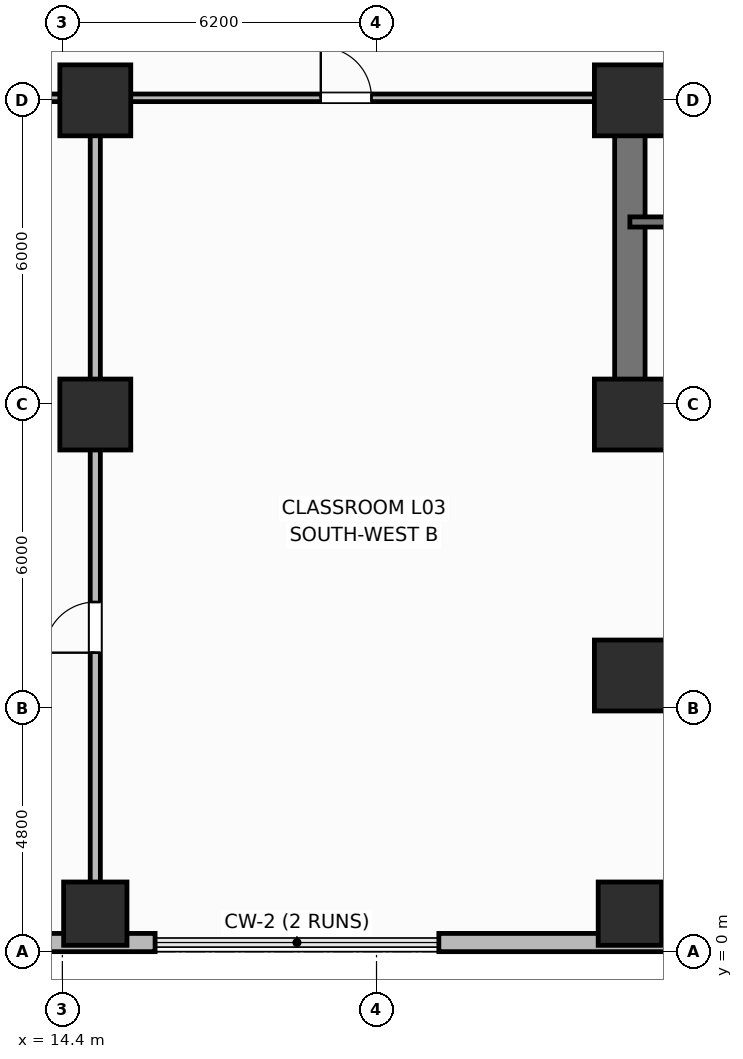
"""IFC4 building model, lengths in metres.
Left out: names, types, materials, properties, quantities, classifications, styles, units other than length and angle.
Written with IfcOpenShell. Run it as: python <this file> out.ifc"""

import sys

from ifc_helpers import new_model, si_unit, direction, frame, frame_2d, origin, origin_2d, place, context, subcontext, project, spatial, rectangle, extrude, element, fill, save


model = new_model("IFC4")
c1 = context("Model", 3, precision=1e-05, world=origin(), true_north=direction((0.0, 1.0)))
c2 = subcontext(c1, "Body", "Model", "MODEL_VIEW")
j1 = project(units=[si_unit("LENGTHUNIT", "METRE"), si_unit("PLANEANGLEUNIT", "RADIAN")], contexts=[c1])
p1 = place(None, origin())
s1 = spatial("IfcSite", under=j1, at=p1, CompositionType="ELEMENT")
p2 = place(p1, origin())
s2 = spatial("IfcBuilding", under=s1, at=p2, CompositionType="ELEMENT")
p3 = place(p2, frame((0.0, 0.0, 15.6)))
s3 = spatial("IfcBuildingStorey", under=s2, at=p3, CompositionType="ELEMENT", Elevation=15.6)
p4 = place(p3, frame((52.8, 10.6, 0.0), z_axis=(0.0, 0.0, 1.0), x_axis=(-1.0, 0.0, 0.0)))
e1 = element("IfcWall", 1, at=p4, inside=s3, PredefinedType="SHEAR", context=c2, shape_type="SweptSolid", body=[
    extrude(rectangle(XDim=27.2, YDim=0.6, at=frame_2d((13.6, 0.0))), origin(), (0.0, 0.0, 1.0), 4.5),
])
p5 = place(p3, frame((25.6, 10.9, 0.0), z_axis=(0.0, 0.0, 1.0), x_axis=(0.0, 1.0, 0.0)))
e2 = element("IfcWall", 2, at=p5, inside=s3, PredefinedType="SHEAR", context=c2, shape_type="SweptSolid", body=[
    extrude(rectangle(XDim=5.6, YDim=0.6, at=frame_2d((2.8, 0.0))), origin(), (0.0, 0.0, 1.0), 4.5),
])
p6 = place(p3, frame((25.6, 16.8, 0.0), z_axis=(0.0, 0.0, 1.0), x_axis=(1.0, 0.0, 0.0)))
e3 = element("IfcWall", 3, at=p6, inside=s3, PredefinedType="SHEAR", context=c2, shape_type="SweptSolid", body=[
    extrude(rectangle(XDim=27.2, YDim=0.6, at=frame_2d((13.6, 0.0))), origin(), (0.0, 0.0, 1.0), 4.5),
])
p7 = place(p6, frame((1.7, 0.0, 0.0)))
e4 = element("IfcOpeningElement", 4, at=p7, cuts=e3, PredefinedType="OPENING", context=c2, shape_type="SweptSolid", body=[
    extrude(rectangle(XDim=1.1, YDim=2.15, at=frame_2d((0.55, 1.075))), frame((0.0, 0.31, 0.0), z_axis=(0.0, -1.0, 0.0), x_axis=(1.0, 0.0, 0.0)), (0.0, 0.0, 1.0), 0.62),
])
p8 = place(p6, frame((4.45, 0.0, 0.0)))
e5 = element("IfcOpeningElement", 5, at=p8, cuts=e3, PredefinedType="OPENING", context=c2, shape_type="SweptSolid", body=[
    extrude(rectangle(XDim=0.85, YDim=2.1, at=frame_2d((0.425, 1.05))), frame((0.0, 0.31, 0.0), z_axis=(0.0, -1.0, 0.0), x_axis=(1.0, 0.0, 0.0)), (0.0, 0.0, 1.0), 0.62),
])
p9 = place(p6, frame((6.5, 0.0, 0.0)))
e6 = element("IfcOpeningElement", 6, at=p9, cuts=e3, PredefinedType="OPENING", context=c2, shape_type="SweptSolid", body=[
    extrude(rectangle(XDim=0.85, YDim=2.1, at=frame_2d((0.425, 1.05))), frame((0.0, 0.31, 0.0), z_axis=(0.0, -1.0, 0.0), x_axis=(1.0, 0.0, 0.0)), (0.0, 0.0, 1.0), 0.62),
])
p10 = place(p6, frame((13.0, 0.0, 0.0)))
e7 = element("IfcOpeningElement", 7, at=p10, cuts=e3, PredefinedType="OPENING", context=c2, shape_type="SweptSolid", body=[
    extrude(rectangle(XDim=1.2, YDim=2.15, at=frame_2d((0.6, 1.075))), frame((0.0, 0.31, 0.0), z_axis=(0.0, -1.0, 0.0), x_axis=(1.0, 0.0, 0.0)), (0.0, 0.0, 1.0), 0.62),
])
p11 = place(p6, frame((20.4, 0.0, 0.0)))
e8 = element("IfcOpeningElement", 8, at=p11, cuts=e3, PredefinedType="OPENING", context=c2, shape_type="SweptSolid", body=[
    extrude(rectangle(XDim=1.3, YDim=2.2, at=frame_2d((0.65, 1.1))), frame((0.0, 0.31, 0.0), z_axis=(0.0, -1.0, 0.0), x_axis=(1.0, 0.0, 0.0)), (0.0, 0.0, 1.0), 0.62),
])
p12 = place(p6, frame((24.65, 0.0, 0.0)))
e9 = element("IfcOpeningElement", 9, at=p12, cuts=e3, PredefinedType="OPENING", context=c2, shape_type="SweptSolid", body=[
    extrude(rectangle(XDim=0.85, YDim=2.1, at=frame_2d((0.425, 1.05))), frame((0.0, 0.31, 0.0), z_axis=(0.0, -1.0, 0.0), x_axis=(1.0, 0.0, 0.0)), (0.0, 0.0, 1.0), 0.62),
])
for number, where, z_axis, x_axis in (
    (10, (25.6, 10.6, 0.0), (0.0, 0.0, 1.0), (1.0, 0.0, 0.0)),
    (11, (25.6, 16.8, 0.0), (0.0, 0.0, 1.0), (1.0, 0.0, 0.0)),
):
    element("IfcColumn", number, at=place(p3, frame(where, z_axis=z_axis, x_axis=x_axis)), inside=s3, PredefinedType="COLUMN", context=c2, shape_type="SweptSolid", body=[
        extrude(rectangle(XDim=1.4, YDim=1.4, at=origin_2d()), origin(), (0.0, 0.0, 1.0), 4.5),
    ])
for number, where, z_axis, x_axis in (
    (12, (15.05, 0.75, 0.0), (0.0, 0.0, 1.0), (1.0, 0.0, 0.0)),
    (13, (25.6, 0.75, 0.0), (0.0, 0.0, 1.0), (1.0, 0.0, 0.0)),
):
    element("IfcColumn", number, at=place(p3, frame(where, z_axis=z_axis, x_axis=x_axis)), inside=s3, PredefinedType="COLUMN", context=c2, shape_type="SweptSolid", body=[
        extrude(rectangle(XDim=1.25, YDim=1.25, at=origin_2d()), origin(), (0.0, 0.0, 1.0), 4.5),
    ])
for number, where, z_axis, x_axis in (
    (14, (25.6, 5.45, 0.0), (0.0, 0.0, 1.0), (1.0, 0.0, 0.0)),
    (15, (15.05, 10.6, 0.0), (0.0, 0.0, 1.0), (1.0, 0.0, 0.0)),
    (16, (15.05, 16.8, 0.0), (0.0, 0.0, 1.0), (1.0, 0.0, 0.0)),
):
    element("IfcColumn", number, at=place(p3, frame(where, z_axis=z_axis, x_axis=x_axis)), inside=s3, PredefinedType="COLUMN", context=c2, shape_type="SweptSolid", body=[
        extrude(rectangle(XDim=1.4, YDim=1.4, at=origin_2d()), origin(), (0.0, 0.0, 1.0), 4.5),
    ])
p13 = place(p3, frame((0.98, 0.18, 0.0), z_axis=(0.0, 0.0, 1.0), x_axis=(1.0, 0.0, 0.0)))
e17 = element("IfcWall", 17, at=p13, inside=s3, PredefinedType="SOLIDWALL", context=c2, shape_type="SweptSolid", body=[
    extrude(rectangle(XDim=15.25, YDim=0.36, at=frame_2d((7.625, 0.0))), origin(), (0.0, 0.0, 1.0), 3.48),
])
p14 = place(p13, frame((1.775, 0.0, 0.85)))
e18 = element("IfcOpeningElement", 18, at=p14, cuts=e17, PredefinedType="OPENING", context=c2, shape_type="SweptSolid", body=[
    extrude(rectangle(XDim=2.4, YDim=2.25, at=frame_2d((1.2, 1.125))), frame((0.0, 0.19, 0.0), z_axis=(0.0, -1.0, 0.0), x_axis=(1.0, 0.0, 0.0)), (0.0, 0.0, 1.0), 0.38),
])
p15 = place(p13, frame((7.475, 0.0, 0.85)))
e19 = element("IfcOpeningElement", 19, at=p15, cuts=e17, PredefinedType="OPENING", context=c2, shape_type="SweptSolid", body=[
    extrude(rectangle(XDim=2.4, YDim=2.25, at=frame_2d((1.2, 1.125))), frame((0.0, 0.19, 0.0), z_axis=(0.0, -1.0, 0.0), x_axis=(1.0, 0.0, 0.0)), (0.0, 0.0, 1.0), 0.38),
])
p16 = place(p13, frame((10.375, 0.0, 0.85)))
e20 = element("IfcOpeningElement", 20, at=p16, cuts=e17, PredefinedType="OPENING", context=c2, shape_type="SweptSolid", body=[
    extrude(rectangle(XDim=2.4, YDim=2.25, at=frame_2d((1.2, 1.125))), frame((0.0, 0.19, 0.0), z_axis=(0.0, -1.0, 0.0), x_axis=(1.0, 0.0, 0.0)), (0.0, 0.0, 1.0), 0.38),
])
p17 = place(p3, frame((21.83, 0.18, 0.0), z_axis=(0.0, 0.0, 1.0), x_axis=(1.0, 0.0, 0.0)))
e21 = element("IfcWall", 21, at=p17, inside=s3, PredefinedType="SOLIDWALL", context=c2, shape_type="SweptSolid", body=[
    extrude(rectangle(XDim=55.59, YDim=0.36, at=frame_2d((27.795, 0.0))), origin(), (0.0, 0.0, 1.0), 3.48),
])
p18 = place(p17, frame((5.267, 0.0, 0.85)))
e22 = element("IfcOpeningElement", 22, at=p18, cuts=e21, PredefinedType="OPENING", context=c2, shape_type="SweptSolid", body=[
    extrude(rectangle(XDim=2.4, YDim=2.25, at=frame_2d((1.2, 1.125))), frame((0.0, 0.19, 0.0), z_axis=(0.0, -1.0, 0.0), x_axis=(1.0, 0.0, 0.0)), (0.0, 0.0, 1.0), 0.38),
])
p19 = place(p17, frame((9.145, 0.0, 0.85)))
e23 = element("IfcOpeningElement", 23, at=p19, cuts=e21, PredefinedType="OPENING", context=c2, shape_type="SweptSolid", body=[
    extrude(rectangle(XDim=2.4, YDim=2.25, at=frame_2d((1.2, 1.125))), frame((0.0, 0.19, 0.0), z_axis=(0.0, -1.0, 0.0), x_axis=(1.0, 0.0, 0.0)), (0.0, 0.0, 1.0), 0.38),
])
p20 = place(p17, frame((13.022, 0.0, 0.85)))
e24 = element("IfcOpeningElement", 24, at=p20, cuts=e21, PredefinedType="OPENING", context=c2, shape_type="SweptSolid", body=[
    extrude(rectangle(XDim=2.4, YDim=2.25, at=frame_2d((1.2, 1.125))), frame((0.0, 0.19, 0.0), z_axis=(0.0, -1.0, 0.0), x_axis=(1.0, 0.0, 0.0)), (0.0, 0.0, 1.0), 0.38),
])
p21 = place(p17, frame((20.778, 0.0, 0.85)))
e25 = element("IfcOpeningElement", 25, at=p21, cuts=e21, PredefinedType="OPENING", context=c2, shape_type="SweptSolid", body=[
    extrude(rectangle(XDim=2.4, YDim=2.25, at=frame_2d((1.2, 1.125))), frame((0.0, 0.19, 0.0), z_axis=(0.0, -1.0, 0.0), x_axis=(1.0, 0.0, 0.0)), (0.0, 0.0, 1.0), 0.38),
])
p22 = place(p17, frame((24.656, 0.0, 0.85)))
e26 = element("IfcOpeningElement", 26, at=p22, cuts=e21, PredefinedType="OPENING", context=c2, shape_type="SweptSolid", body=[
    extrude(rectangle(XDim=2.4, YDim=2.25, at=frame_2d((1.2, 1.125))), frame((0.0, 0.19, 0.0), z_axis=(0.0, -1.0, 0.0), x_axis=(1.0, 0.0, 0.0)), (0.0, 0.0, 1.0), 0.38),
])
p23 = place(p17, frame((32.412, 0.0, 0.85)))
e27 = element("IfcOpeningElement", 27, at=p23, cuts=e21, PredefinedType="OPENING", context=c2, shape_type="SweptSolid", body=[
    extrude(rectangle(XDim=2.4, YDim=2.25, at=frame_2d((1.2, 1.125))), frame((0.0, 0.19, 0.0), z_axis=(0.0, -1.0, 0.0), x_axis=(1.0, 0.0, 0.0)), (0.0, 0.0, 1.0), 0.38),
])
p24 = place(p17, frame((36.29, 0.0, 0.85)))
e28 = element("IfcOpeningElement", 28, at=p24, cuts=e21, PredefinedType="OPENING", context=c2, shape_type="SweptSolid", body=[
    extrude(rectangle(XDim=2.4, YDim=2.25, at=frame_2d((1.2, 1.125))), frame((0.0, 0.19, 0.0), z_axis=(0.0, -1.0, 0.0), x_axis=(1.0, 0.0, 0.0)), (0.0, 0.0, 1.0), 0.38),
])
p25 = place(p17, frame((44.045, 0.0, 0.85)))
e29 = element("IfcOpeningElement", 29, at=p25, cuts=e21, PredefinedType="OPENING", context=c2, shape_type="SweptSolid", body=[
    extrude(rectangle(XDim=2.4, YDim=2.25, at=frame_2d((1.2, 1.125))), frame((0.0, 0.19, 0.0), z_axis=(0.0, -1.0, 0.0), x_axis=(1.0, 0.0, 0.0)), (0.0, 0.0, 1.0), 0.38),
])
p26 = place(p17, frame((51.801, 0.0, 0.85)))
e30 = element("IfcOpeningElement", 30, at=p26, cuts=e21, PredefinedType="OPENING", context=c2, shape_type="SweptSolid", body=[
    extrude(rectangle(XDim=2.4, YDim=2.25, at=frame_2d((1.2, 1.125))), frame((0.0, 0.19, 0.0), z_axis=(0.0, -1.0, 0.0), x_axis=(1.0, 0.0, 0.0)), (0.0, 0.0, 1.0), 0.38),
])
p27 = place(p3, frame((25.6, 14.4, 0.0), z_axis=(0.0, 0.0, 1.0), x_axis=(1.0, 0.0, 0.0)))
e31 = element("IfcWall", 31, at=p27, inside=s3, PredefinedType="SHEAR", context=c2, shape_type="SweptSolid", body=[
    extrude(rectangle(XDim=9.55, YDim=0.2, at=frame_2d((4.775, 0.0))), origin(), (0.0, 0.0, 1.0), 4.5),
])
p28 = place(p27, frame((1.05, 0.0, 0.0)))
e32 = element("IfcOpeningElement", 32, at=p28, cuts=e31, PredefinedType="OPENING", context=c2, shape_type="SweptSolid", body=[
    extrude(rectangle(XDim=1.1, YDim=2.15, at=frame_2d((0.55, 1.075))), frame((0.0, 0.11, 0.0), z_axis=(0.0, -1.0, 0.0), x_axis=(1.0, 0.0, 0.0)), (0.0, 0.0, 1.0), 0.22),
])
p29 = place(p3, frame((15.05, 0.4, 0.0), z_axis=(0.0, 0.0, 1.0), x_axis=(0.0, 1.0, 0.0)))
e33 = element("IfcWall", 33, at=p29, inside=s3, PredefinedType="PARTITIONING", context=c2, shape_type="SweptSolid", body=[
    extrude(rectangle(XDim=16.4, YDim=0.2, at=frame_2d((8.2, 0.0))), origin(), (0.0, 0.0, 1.0), 3.42),
])
p30 = place(p29, frame((5.5, 0.0, 0.0)))
e34 = element("IfcOpeningElement", 34, at=p30, cuts=e33, PredefinedType="OPENING", context=c2, shape_type="SweptSolid", body=[
    extrude(rectangle(XDim=1.0, YDim=2.15, at=frame_2d((0.5, 1.075))), frame((0.0, 0.11, 0.0), z_axis=(0.0, -1.0, 0.0), x_axis=(1.0, 0.0, 0.0)), (0.0, 0.0, 1.0), 0.22),
])
p31 = place(p3, frame((12.0, 16.85, 0.0), z_axis=(0.0, 0.0, 1.0), x_axis=(1.0, 0.0, 0.0)))
e35 = element("IfcWall", 35, at=p31, inside=s3, PredefinedType="PARTITIONING", context=c2, shape_type="SweptSolid", body=[
    extrude(rectangle(XDim=13.25, YDim=0.15, at=frame_2d((6.625, 0.0))), origin(), (0.0, 0.0, 1.0), 3.42),
])
p32 = place(p31, frame((7.5, 0.0, 0.0)))
e36 = element("IfcOpeningElement", 36, at=p32, cuts=e35, PredefinedType="OPENING", context=c2, shape_type="SweptSolid", body=[
    extrude(rectangle(XDim=1.0, YDim=2.15, at=frame_2d((0.5, 1.075))), frame((0.0, 0.085, 0.0), z_axis=(0.0, -1.0, 0.0), x_axis=(1.0, 0.0, 0.0)), (0.0, 0.0, 1.0), 0.17),
])
p33 = place(p30, origin())
e37 = element("IfcDoor", 37, at=p33, inside=s3, OperationType="SINGLE_SWING_LEFT", PredefinedType="DOOR", context=c2, shape_type="SweptSolid", body=[
    extrude(rectangle(XDim=1.0, YDim=2.15, at=frame_2d((0.5, 1.075))), frame((0.0, 0.025, 0.0), z_axis=(0.0, -1.0, 0.0), x_axis=(1.0, 0.0, 0.0)), (0.0, 0.0, 1.0), 0.05),
])
fill(e34, e37)
p34 = place(p32, origin())
e38 = element("IfcDoor", 38, at=p34, inside=s3, OperationType="SINGLE_SWING_LEFT", PredefinedType="DOOR", context=c2, shape_type="SweptSolid", body=[
    extrude(rectangle(XDim=1.0, YDim=2.15, at=frame_2d((0.5, 1.075))), frame((0.0, 0.025, 0.0), z_axis=(0.0, -1.0, 0.0), x_axis=(1.0, 0.0, 0.0)), (0.0, 0.0, 1.0), 0.05),
])
fill(e36, e38)
save(model, sys.argv[1])
